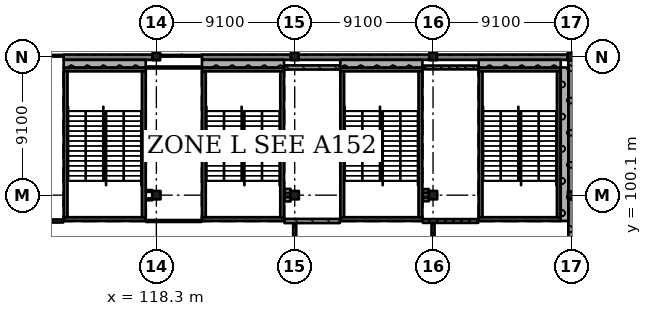
"""IFC4 building model, lengths in metres.
Left out: names, types, materials, properties, quantities, classifications, styles, units other than length and angle.
Written with IfcOpenShell. Run it as: python <this file> out.ifc"""

import sys

from ifc_helpers import new_model, si_unit, direction, frame, frame_2d, origin, origin_2d, place, context, subcontext, project, spatial, rectangle, extrude, element, fill, save


model = new_model("IFC4")
c1 = context("Model", 3, precision=1e-05, world=origin(), true_north=direction((0.0, 1.0)))
c2 = subcontext(c1, "Body", "Model", "MODEL_VIEW")
j1 = project(units=[si_unit("LENGTHUNIT", "METRE"), si_unit("PLANEANGLEUNIT", "RADIAN")], contexts=[c1])
p1 = place(None, origin())
s1 = spatial("IfcSite", under=j1, at=p1, CompositionType="ELEMENT")
p2 = place(p1, origin())
s2 = spatial("IfcBuilding", under=s1, at=p2, CompositionType="ELEMENT")
p3 = place(p2, frame((0.0, 0.0, 15.47)))
s3 = spatial("IfcBuildingStorey", under=s2, at=p3, CompositionType="ELEMENT", Elevation=15.47)
p4 = place(p3, frame((118.3, 100.1, 0.0), z_axis=(0.0, 0.0, 1.0), x_axis=(1.0, 0.0, 0.0)))
e1 = element("IfcColumn", 1, at=p4, inside=s3, PredefinedType="COLUMN", context=c2, shape_type="SweptSolid", body=[
    extrude(rectangle(XDim=0.55, YDim=0.55, at=origin_2d()), origin(), (0.0, 0.0, 1.0), 4.55),
])
p5 = place(p3, frame((118.3, 109.225, 0.0), z_axis=(0.0, 0.0, 1.0), x_axis=(1.0, 0.0, 0.0)))
e2 = element("IfcColumn", 2, at=p5, inside=s3, PredefinedType="COLUMN", context=c2, shape_type="SweptSolid", body=[
    extrude(rectangle(XDim=0.5, YDim=0.5, at=origin_2d()), origin(), (0.0, 0.0, 1.0), 4.55),
])
p6 = place(p3, frame((127.4, 100.1, 0.0), z_axis=(0.0, 0.0, 1.0), x_axis=(1.0, 0.0, 0.0)))
e3 = element("IfcColumn", 3, at=p6, inside=s3, PredefinedType="COLUMN", context=c2, shape_type="SweptSolid", body=[
    extrude(rectangle(XDim=0.55, YDim=0.55, at=origin_2d()), origin(), (0.0, 0.0, 1.0), 4.55),
])
p7 = place(p3, frame((127.4, 109.225, 0.0), z_axis=(0.0, 0.0, 1.0), x_axis=(1.0, 0.0, 0.0)))
e4 = element("IfcColumn", 4, at=p7, inside=s3, PredefinedType="COLUMN", context=c2, shape_type="SweptSolid", body=[
    extrude(rectangle(XDim=0.5, YDim=0.5, at=origin_2d()), origin(), (0.0, 0.0, 1.0), 4.55),
])
p8 = place(p3, frame((136.5, 100.1, 0.0), z_axis=(0.0, 0.0, 1.0), x_axis=(1.0, 0.0, 0.0)))
e5 = element("IfcColumn", 5, at=p8, inside=s3, PredefinedType="COLUMN", context=c2, shape_type="SweptSolid", body=[
    extrude(rectangle(XDim=0.55, YDim=0.55, at=origin_2d()), origin(), (0.0, 0.0, 1.0), 4.55),
])
for number, where, z_axis, x_axis in (
    (6, (136.5, 109.225, 0.0), (0.0, 0.0, 1.0), (1.0, 0.0, 0.0)),
    (7, (145.625, 100.1, 0.0), (0.0, 0.0, 1.0), (1.0, 0.0, 0.0)),
    (8, (145.6, 109.2, 0.0), (0.0, 0.0, 1.0), (1.0, 0.0, 0.0)),
):
    element("IfcColumn", number, at=place(p3, frame(where, z_axis=z_axis, x_axis=x_axis)), inside=s3, PredefinedType="COLUMN", context=c2, shape_type="SweptSolid", body=[
        extrude(rectangle(XDim=0.5, YDim=0.5, at=origin_2d()), origin(), (0.0, 0.0, 1.0), 4.55),
    ])
p9 = place(p3, frame((144.9, 98.525, 0.0), z_axis=(0.0, 0.0, 1.0), x_axis=(-1.0, 0.0, 0.0)))
e9 = element("IfcWall", 9, at=p9, inside=s3, PredefinedType="SHEAR", context=c2, shape_type="SweptSolid", body=[
    extrude(rectangle(XDim=5.4, YDim=0.25, at=frame_2d((2.7, 0.0))), origin(), (0.0, 0.0, 1.0), 4.55),
])
p10 = place(p9, frame((1.5, 0.0, 0.0)))
e10 = element("IfcOpeningElement", 10, at=p10, cuts=e9, PredefinedType="OPENING", context=c2, shape_type="SweptSolid", body=[
    extrude(rectangle(XDim=2.4, YDim=2.1, at=frame_2d((1.2, 1.05))), frame((0.0, 0.135, 0.0), z_axis=(0.0, -1.0, 0.0), x_axis=(1.0, 0.0, 0.0)), (0.0, 0.0, 1.0), 0.27),
])
p11 = place(p3, frame((144.9, 108.375, 0.0), z_axis=(0.0, 0.0, 1.0), x_axis=(-1.0, 0.0, 0.0)))
e11 = element("IfcWall", 11, at=p11, inside=s3, PredefinedType="SHEAR", context=c2, shape_type="SweptSolid", body=[
    extrude(rectangle(XDim=5.4, YDim=0.25, at=frame_2d((2.7, 0.0))), origin(), (0.0, 0.0, 1.0), 4.55),
])
for number, where, z_axis, x_axis in (
    (12, (139.625, 108.25, 0.0), (0.0, 0.0, 1.0), (0.0, -1.0, 0.0)),
    (13, (144.775, 108.25, 0.0), (0.0, 0.0, 1.0), (0.0, -1.0, 0.0)),
):
    element("IfcWall", number, at=place(p3, frame(where, z_axis=z_axis, x_axis=x_axis)), inside=s3, PredefinedType="SHEAR", context=c2, shape_type="SweptSolid", body=[
        extrude(rectangle(XDim=9.6, YDim=0.25, at=frame_2d((4.8, 0.0))), origin(), (0.0, 0.0, 1.0), 4.55),
    ])
p12 = place(p3, frame((135.8, 98.525, 0.0), z_axis=(0.0, 0.0, 1.0), x_axis=(-1.0, 0.0, 0.0)))
e14 = element("IfcWall", 14, at=p12, inside=s3, PredefinedType="SHEAR", context=c2, shape_type="SweptSolid", body=[
    extrude(rectangle(XDim=5.4, YDim=0.25, at=frame_2d((2.7, 0.0))), origin(), (0.0, 0.0, 1.0), 4.55),
])
p13 = place(p12, frame((1.5, 0.0, 0.0)))
e15 = element("IfcOpeningElement", 15, at=p13, cuts=e14, PredefinedType="OPENING", context=c2, shape_type="SweptSolid", body=[
    extrude(rectangle(XDim=2.4, YDim=2.1, at=frame_2d((1.2, 1.05))), frame((0.0, 0.135, 0.0), z_axis=(0.0, -1.0, 0.0), x_axis=(1.0, 0.0, 0.0)), (0.0, 0.0, 1.0), 0.27),
])
p14 = place(p3, frame((135.8, 108.375, 0.0), z_axis=(0.0, 0.0, 1.0), x_axis=(-1.0, 0.0, 0.0)))
e16 = element("IfcWall", 16, at=p14, inside=s3, PredefinedType="SHEAR", context=c2, shape_type="SweptSolid", body=[
    extrude(rectangle(XDim=5.4, YDim=0.25, at=frame_2d((2.7, 0.0))), origin(), (0.0, 0.0, 1.0), 4.55),
])
for number, where, z_axis, x_axis in (
    (17, (130.525, 108.25, 0.0), (0.0, 0.0, 1.0), (0.0, -1.0, 0.0)),
    (18, (135.675, 108.25, 0.0), (0.0, 0.0, 1.0), (0.0, -1.0, 0.0)),
):
    element("IfcWall", number, at=place(p3, frame(where, z_axis=z_axis, x_axis=x_axis)), inside=s3, PredefinedType="SHEAR", context=c2, shape_type="SweptSolid", body=[
        extrude(rectangle(XDim=9.6, YDim=0.25, at=frame_2d((4.8, 0.0))), origin(), (0.0, 0.0, 1.0), 4.55),
    ])
p15 = place(p3, frame((126.7, 98.525, 0.0), z_axis=(0.0, 0.0, 1.0), x_axis=(-1.0, 0.0, 0.0)))
e19 = element("IfcWall", 19, at=p15, inside=s3, PredefinedType="SHEAR", context=c2, shape_type="SweptSolid", body=[
    extrude(rectangle(XDim=5.4, YDim=0.25, at=frame_2d((2.7, 0.0))), origin(), (0.0, 0.0, 1.0), 4.55),
])
p16 = place(p15, frame((1.5, 0.0, 0.0)))
e20 = element("IfcOpeningElement", 20, at=p16, cuts=e19, PredefinedType="OPENING", context=c2, shape_type="SweptSolid", body=[
    extrude(rectangle(XDim=2.4, YDim=2.1, at=frame_2d((1.2, 1.05))), frame((0.0, 0.135, 0.0), z_axis=(0.0, -1.0, 0.0), x_axis=(1.0, 0.0, 0.0)), (0.0, 0.0, 1.0), 0.27),
])
p17 = place(p3, frame((126.7, 108.375, 0.0), z_axis=(0.0, 0.0, 1.0), x_axis=(-1.0, 0.0, 0.0)))
e21 = element("IfcWall", 21, at=p17, inside=s3, PredefinedType="SHEAR", context=c2, shape_type="SweptSolid", body=[
    extrude(rectangle(XDim=5.4, YDim=0.25, at=frame_2d((2.7, 0.0))), origin(), (0.0, 0.0, 1.0), 4.55),
])
for number, where, z_axis, x_axis in (
    (22, (121.425, 108.25, 0.0), (0.0, 0.0, 1.0), (0.0, -1.0, 0.0)),
    (23, (126.575, 108.25, 0.0), (0.0, 0.0, 1.0), (0.0, -1.0, 0.0)),
):
    element("IfcWall", number, at=place(p3, frame(where, z_axis=z_axis, x_axis=x_axis)), inside=s3, PredefinedType="SHEAR", context=c2, shape_type="SweptSolid", body=[
        extrude(rectangle(XDim=9.6, YDim=0.25, at=frame_2d((4.8, 0.0))), origin(), (0.0, 0.0, 1.0), 4.55),
    ])
p18 = place(p3, frame((117.6, 98.525, 0.0), z_axis=(0.0, 0.0, 1.0), x_axis=(-1.0, 0.0, 0.0)))
e24 = element("IfcWall", 24, at=p18, inside=s3, PredefinedType="SHEAR", context=c2, shape_type="SweptSolid", body=[
    extrude(rectangle(XDim=5.4, YDim=0.25, at=frame_2d((2.7, 0.0))), origin(), (0.0, 0.0, 1.0), 4.55),
])
p19 = place(p18, frame((1.5, 0.0, 0.0)))
e25 = element("IfcOpeningElement", 25, at=p19, cuts=e24, PredefinedType="OPENING", context=c2, shape_type="SweptSolid", body=[
    extrude(rectangle(XDim=2.4, YDim=2.1, at=frame_2d((1.2, 1.05))), frame((0.0, 0.135, 0.0), z_axis=(0.0, -1.0, 0.0), x_axis=(1.0, 0.0, 0.0)), (0.0, 0.0, 1.0), 0.27),
])
p20 = place(p3, frame((117.6, 108.375, 0.0), z_axis=(0.0, 0.0, 1.0), x_axis=(-1.0, 0.0, 0.0)))
e26 = element("IfcWall", 26, at=p20, inside=s3, PredefinedType="SHEAR", context=c2, shape_type="SweptSolid", body=[
    extrude(rectangle(XDim=5.4, YDim=0.25, at=frame_2d((2.7, 0.0))), origin(), (0.0, 0.0, 1.0), 4.55),
])
for number, where, z_axis, x_axis in (
    (27, (112.325, 108.25, 0.0), (0.0, 0.0, 1.0), (0.0, -1.0, 0.0)),
    (28, (117.475, 108.25, 0.0), (0.0, 0.0, 1.0), (0.0, -1.0, 0.0)),
):
    element("IfcWall", number, at=place(p3, frame(where, z_axis=z_axis, x_axis=x_axis)), inside=s3, PredefinedType="SHEAR", context=c2, shape_type="SweptSolid", body=[
        extrude(rectangle(XDim=9.6, YDim=0.25, at=frame_2d((4.8, 0.0))), origin(), (0.0, 0.0, 1.0), 4.55),
    ])
p21 = place(p3, frame((145.575, 91.25, 0.0), z_axis=(0.0, 0.0, 1.0), x_axis=(0.0, 1.0, 0.0)))
e29 = element("IfcWall", 29, at=p21, inside=s3, PredefinedType="SOLIDWALL", context=c2, shape_type="SweptSolid", body=[
    extrude(rectangle(XDim=8.6, YDim=0.35, at=frame_2d((4.3, 0.0))), origin(), (0.0, 0.0, 1.0), 3.55),
])
p22 = place(p3, frame((145.575, 100.35, 0.0), z_axis=(0.0, 0.0, 1.0), x_axis=(0.0, 1.0, 0.0)))
e30 = element("IfcWall", 30, at=p22, inside=s3, PredefinedType="SOLIDWALL", context=c2, shape_type="SweptSolid", body=[
    extrude(rectangle(XDim=8.6, YDim=0.35, at=frame_2d((4.3, 0.0))), origin(), (0.0, 0.0, 1.0), 3.55),
])
for number, where, z_axis, x_axis in (
    (31, (145.35, 109.175, 0.0), (0.0, 0.0, 1.0), (-1.0, 0.0, 0.0)),
    (32, (136.25, 109.175, 0.0), (0.0, 0.0, 1.0), (-1.0, 0.0, 0.0)),
):
    element("IfcWall", number, at=place(p3, frame(where, z_axis=z_axis, x_axis=x_axis)), inside=s3, PredefinedType="SOLIDWALL", context=c2, shape_type="SweptSolid", body=[
        extrude(rectangle(XDim=8.6, YDim=0.35, at=frame_2d((4.3, 0.0))), origin(), (0.0, 0.0, 1.0), 3.55),
    ])
p23 = place(p3, frame((127.15, 109.175, 0.0), z_axis=(0.0, 0.0, 1.0), x_axis=(-1.0, 0.0, 0.0)))
e33 = element("IfcWall", 33, at=p23, inside=s3, PredefinedType="SOLIDWALL", context=c2, shape_type="SweptSolid", body=[
    extrude(rectangle(XDim=5.85, YDim=0.35, at=frame_2d((2.925, 0.0))), origin(), (0.0, 0.0, 1.0), 3.55),
])
p24 = place(p3, frame((118.05, 109.175, 0.0), z_axis=(0.0, 0.0, 1.0), x_axis=(-1.0, 0.0, 0.0)))
e34 = element("IfcWall", 34, at=p24, inside=s3, PredefinedType="SOLIDWALL", context=c2, shape_type="SweptSolid", body=[
    extrude(rectangle(XDim=5.85, YDim=0.35, at=frame_2d((2.925, 0.0))), origin(), (0.0, 0.0, 1.0), 3.55),
])
p25 = place(p3, frame((139.5, 108.75, 0.0), z_axis=(0.0, 0.0, 1.0), x_axis=(1.0, 0.0, 0.0)))
e35 = element("IfcWall", 35, at=p25, inside=s3, PredefinedType="SOLIDWALL", context=c2, shape_type="SweptSolid", body=[
    extrude(rectangle(XDim=5.4, YDim=0.5, at=frame_2d((2.7, 0.0))), origin(), (0.0, 0.0, 1.0), 4.3),
])
p26 = place(p3, frame((145.15, 98.4, 0.0), z_axis=(0.0, 0.0, 1.0), x_axis=(0.0, 1.0, 0.0)))
e36 = element("IfcWall", 36, at=p26, inside=s3, PredefinedType="SOLIDWALL", context=c2, shape_type="SweptSolid", body=[
    extrude(rectangle(XDim=10.1, YDim=0.5, at=frame_2d((5.05, 0.0))), origin(), (0.0, 0.0, 1.0), 4.55),
])
p27 = place(p3, frame((130.4, 108.75, 0.0), z_axis=(0.0, 0.0, 1.0), x_axis=(1.0, 0.0, 0.0)))
e37 = element("IfcWall", 37, at=p27, inside=s3, PredefinedType="SOLIDWALL", context=c2, shape_type="SweptSolid", body=[
    extrude(rectangle(XDim=5.4, YDim=0.5, at=frame_2d((2.7, 0.0))), origin(), (0.0, 0.0, 1.0), 4.3),
])
p28 = place(p3, frame((121.3, 108.75, 0.0), z_axis=(0.0, 0.0, 1.0), x_axis=(1.0, 0.0, 0.0)))
e38 = element("IfcWall", 38, at=p28, inside=s3, PredefinedType="SOLIDWALL", context=c2, shape_type="SweptSolid", body=[
    extrude(rectangle(XDim=5.4, YDim=0.5, at=frame_2d((2.7, 0.0))), origin(), (0.0, 0.0, 1.0), 4.3),
])
p29 = place(p3, frame((112.2, 108.75, 0.0), z_axis=(0.0, 0.0, 1.0), x_axis=(1.0, 0.0, 0.0)))
e39 = element("IfcWall", 39, at=p29, inside=s3, PredefinedType="SOLIDWALL", context=c2, shape_type="SweptSolid", body=[
    extrude(rectangle(XDim=5.4, YDim=0.5, at=frame_2d((2.7, 0.0))), origin(), (0.0, 0.0, 1.0), 4.3),
])
p30 = place(p3, frame((109.425, 98.4, 0.0), z_axis=(0.0, 0.0, 1.0), x_axis=(1.0, 0.0, 0.0)))
e40 = element("IfcWall", 40, at=p30, inside=s3, PredefinedType="PARTITIONING", context=c2, shape_type="SweptSolid", body=[
    extrude(rectangle(XDim=2.745, YDim=0.2, at=frame_2d((1.373, 0.0))), origin(), (0.0, 0.0, 1.0), 4.3),
])
p31 = place(p30, frame((0.45, 0.0, 0.0)))
e41 = element("IfcOpeningElement", 41, at=p31, cuts=e40, PredefinedType="OPENING", context=c2, shape_type="SweptSolid", body=[
    extrude(rectangle(XDim=1.8, YDim=2.4, at=frame_2d((0.9, 1.2))), frame((0.0, 0.11, 0.0), z_axis=(0.0, -1.0, 0.0), x_axis=(1.0, 0.0, 0.0)), (0.0, 0.0, 1.0), 0.22),
])
p32 = place(p3, frame((117.63, 98.4, 0.0), z_axis=(0.0, 0.0, 1.0), x_axis=(1.0, 0.0, 0.0)))
e42 = element("IfcWall", 42, at=p32, inside=s3, PredefinedType="PARTITIONING", context=c2, shape_type="SweptSolid", body=[
    extrude(rectangle(XDim=3.64, YDim=0.125, at=frame_2d((1.82, 0.0))), origin(), (0.0, 0.0, 1.0), 4.3),
])
p33 = place(p32, frame((1.35, 0.0, 0.0)))
e43 = element("IfcOpeningElement", 43, at=p33, cuts=e42, PredefinedType="OPENING", context=c2, shape_type="SweptSolid", body=[
    extrude(rectangle(XDim=0.9, YDim=2.1, at=frame_2d((0.45, 1.05))), frame((0.0, 0.073, 0.0), z_axis=(0.0, -1.0, 0.0), x_axis=(1.0, 0.0, 0.0)), (0.0, 0.0, 1.0), 0.145),
])
p34 = place(p3, frame((117.63, 99.825, 0.0), z_axis=(0.0, 0.0, 1.0), x_axis=(1.0, 0.0, 0.0)))
e44 = element("IfcWall", 44, at=p34, inside=s3, PredefinedType="PARTITIONING", context=c2, shape_type="SweptSolid", body=[
    extrude(rectangle(XDim=0.395, YDim=0.125, at=frame_2d((0.198, 0.0))), origin(), (0.0, 0.0, 1.0), 4.3),
])
p35 = place(p3, frame((117.63, 108.5, 0.0), z_axis=(0.0, 0.0, 1.0), x_axis=(1.0, 0.0, 0.0)))
e45 = element("IfcWall", 45, at=p35, inside=s3, PredefinedType="PARTITIONING", context=c2, shape_type="SweptSolid", body=[
    extrude(rectangle(XDim=3.64, YDim=0.125, at=frame_2d((1.82, 0.0))), origin(), (0.0, 0.0, 1.0), 4.3),
])
p36 = place(p3, frame((118.025, 100.375, 0.0), z_axis=(0.0, 0.0, 1.0), x_axis=(-1.0, 0.0, 0.0)))
e46 = element("IfcWall", 46, at=p36, inside=s3, PredefinedType="PARTITIONING", context=c2, shape_type="SweptSolid", body=[
    extrude(rectangle(XDim=0.395, YDim=0.125, at=frame_2d((0.198, 0.0))), origin(), (0.0, 0.0, 1.0), 4.3),
])
p37 = place(p3, frame((126.73, 98.4, 0.0), z_axis=(0.0, 0.0, 1.0), x_axis=(1.0, 0.0, 0.0)))
e47 = element("IfcWall", 47, at=p37, inside=s3, PredefinedType="SOLIDWALL", context=c2, shape_type="SweptSolid", body=[
    extrude(rectangle(XDim=3.64, YDim=0.275, at=frame_2d((1.82, 0.0))), origin(), (0.0, 0.0, 1.0), 4.3),
])
p38 = place(p37, frame((1.52, 0.0, 0.0)))
e48 = element("IfcOpeningElement", 48, at=p38, cuts=e47, PredefinedType="OPENING", context=c2, shape_type="SweptSolid", body=[
    extrude(rectangle(XDim=1.2, YDim=2.4, at=frame_2d((0.6, 1.2))), frame((0.0, 0.147, 0.0), z_axis=(0.0, -1.0, 0.0), x_axis=(1.0, 0.0, 0.0)), (0.0, 0.0, 1.0), 0.295),
])
p39 = place(p3, frame((126.73, 99.825, 0.0), z_axis=(0.0, 0.0, 1.0), x_axis=(1.0, 0.0, 0.0)))
e49 = element("IfcWall", 49, at=p39, inside=s3, PredefinedType="SOLIDWALL", context=c2, shape_type="SweptSolid", body=[
    extrude(rectangle(XDim=0.395, YDim=0.275, at=frame_2d((0.198, 0.0))), origin(), (0.0, 0.0, 1.0), 4.3),
])
p40 = place(p3, frame((126.73, 108.5, 0.0), z_axis=(0.0, 0.0, 1.0), x_axis=(1.0, 0.0, 0.0)))
e50 = element("IfcWall", 50, at=p40, inside=s3, PredefinedType="SOLIDWALL", context=c2, shape_type="SweptSolid", body=[
    extrude(rectangle(XDim=3.64, YDim=0.275, at=frame_2d((1.82, 0.0))), origin(), (0.0, 0.0, 1.0), 4.3),
])
p41 = place(p3, frame((127.125, 100.375, 0.0), z_axis=(0.0, 0.0, 1.0), x_axis=(-1.0, 0.0, 0.0)))
e51 = element("IfcWall", 51, at=p41, inside=s3, PredefinedType="SOLIDWALL", context=c2, shape_type="SweptSolid", body=[
    extrude(rectangle(XDim=0.395, YDim=0.275, at=frame_2d((0.198, 0.0))), origin(), (0.0, 0.0, 1.0), 4.3),
])
p42 = place(p3, frame((127.4, 91.35, 0.0), z_axis=(0.0, 0.0, 1.0), x_axis=(0.0, 1.0, 0.0)))
e52 = element("IfcWall", 52, at=p42, inside=s3, PredefinedType="PARTITIONING", context=c2, shape_type="SweptSolid", body=[
    extrude(rectangle(XDim=6.912, YDim=0.2, at=frame_2d((3.456, 0.0))), origin(), (0.0, 0.0, 1.0), 3.55),
])
p43 = place(p42, frame((0.85, 0.0, 0.0)))
e53 = element("IfcOpeningElement", 53, at=p43, cuts=e52, PredefinedType="OPENING", context=c2, shape_type="SweptSolid", body=[
    extrude(rectangle(XDim=1.8, YDim=2.4, at=frame_2d((0.9, 1.2))), frame((0.0, 0.11, 0.0), z_axis=(0.0, -1.0, 0.0), x_axis=(1.0, 0.0, 0.0)), (0.0, 0.0, 1.0), 0.22),
])
p44 = place(p42, frame((4.25, 0.0, 0.0)))
e54 = element("IfcOpeningElement", 54, at=p44, cuts=e52, PredefinedType="OPENING", context=c2, shape_type="SweptSolid", body=[
    extrude(rectangle(XDim=1.8, YDim=2.4, at=frame_2d((0.9, 1.2))), frame((0.0, 0.11, 0.0), z_axis=(0.0, -1.0, 0.0), x_axis=(1.0, 0.0, 0.0)), (0.0, 0.0, 1.0), 0.22),
])
p45 = place(p3, frame((135.83, 98.4, 0.0), z_axis=(0.0, 0.0, 1.0), x_axis=(1.0, 0.0, 0.0)))
e55 = element("IfcWall", 55, at=p45, inside=s3, PredefinedType="SOLIDWALL", context=c2, shape_type="SweptSolid", body=[
    extrude(rectangle(XDim=3.64, YDim=0.25, at=frame_2d((1.82, 0.0))), origin(), (0.0, 0.0, 1.0), 4.3),
])
p46 = place(p45, frame((1.62, 0.0, 0.0)))
e56 = element("IfcOpeningElement", 56, at=p46, cuts=e55, PredefinedType="OPENING", context=c2, shape_type="SweptSolid", body=[
    extrude(rectangle(XDim=1.0, YDim=2.1, at=frame_2d((0.5, 1.05))), frame((0.0, 0.135, 0.0), z_axis=(0.0, -1.0, 0.0), x_axis=(1.0, 0.0, 0.0)), (0.0, 0.0, 1.0), 0.27),
])
p47 = place(p3, frame((135.83, 99.825, 0.0), z_axis=(0.0, 0.0, 1.0), x_axis=(1.0, 0.0, 0.0)))
e57 = element("IfcWall", 57, at=p47, inside=s3, PredefinedType="SOLIDWALL", context=c2, shape_type="SweptSolid", body=[
    extrude(rectangle(XDim=0.395, YDim=0.25, at=frame_2d((0.198, 0.0))), origin(), (0.0, 0.0, 1.0), 4.3),
])
p48 = place(p3, frame((135.83, 108.5, 0.0), z_axis=(0.0, 0.0, 1.0), x_axis=(1.0, 0.0, 0.0)))
e58 = element("IfcWall", 58, at=p48, inside=s3, PredefinedType="SOLIDWALL", context=c2, shape_type="SweptSolid", body=[
    extrude(rectangle(XDim=3.64, YDim=0.25, at=frame_2d((1.82, 0.0))), origin(), (0.0, 0.0, 1.0), 4.3),
])
p49 = place(p3, frame((136.225, 100.375, 0.0), z_axis=(0.0, 0.0, 1.0), x_axis=(-1.0, 0.0, 0.0)))
e59 = element("IfcWall", 59, at=p49, inside=s3, PredefinedType="SOLIDWALL", context=c2, shape_type="SweptSolid", body=[
    extrude(rectangle(XDim=0.395, YDim=0.25, at=frame_2d((0.198, 0.0))), origin(), (0.0, 0.0, 1.0), 4.3),
])
p50 = place(p3, frame((136.5, 91.325, 0.0), z_axis=(0.0, 0.0, 1.0), x_axis=(0.0, 1.0, 0.0)))
e60 = element("IfcWall", 60, at=p50, inside=s3, PredefinedType="PARTITIONING", context=c2, shape_type="SweptSolid", body=[
    extrude(rectangle(XDim=6.95, YDim=0.2, at=frame_2d((3.475, 0.0))), origin(), (0.0, 0.0, 1.0), 3.55),
])
p51 = place(p50, frame((0.85, 0.0, 0.0)))
e61 = element("IfcOpeningElement", 61, at=p51, cuts=e60, PredefinedType="OPENING", context=c2, shape_type="SweptSolid", body=[
    extrude(rectangle(XDim=1.8, YDim=2.4, at=frame_2d((0.9, 1.2))), frame((0.0, 0.11, 0.0), z_axis=(0.0, -1.0, 0.0), x_axis=(1.0, 0.0, 0.0)), (0.0, 0.0, 1.0), 0.22),
])
p52 = place(p50, frame((4.35, 0.0, 0.0)))
e62 = element("IfcOpeningElement", 62, at=p52, cuts=e60, PredefinedType="OPENING", context=c2, shape_type="SweptSolid", body=[
    extrude(rectangle(XDim=1.8, YDim=2.4, at=frame_2d((0.9, 1.2))), frame((0.0, 0.11, 0.0), z_axis=(0.0, -1.0, 0.0), x_axis=(1.0, 0.0, 0.0)), (0.0, 0.0, 1.0), 0.22),
])
p53 = place(p46, origin())
e63 = element("IfcDoor", 63, at=p53, inside=s3, OperationType="SINGLE_SWING_RIGHT", PredefinedType="DOOR", context=c2, shape_type="SweptSolid", body=[
    extrude(rectangle(XDim=1.0, YDim=2.1, at=frame_2d((0.5, 1.05))), frame((0.0, 0.025, 0.0), z_axis=(0.0, -1.0, 0.0), x_axis=(1.0, 0.0, 0.0)), (0.0, 0.0, 1.0), 0.05),
])
fill(e56, e63)
p54 = place(p38, origin())
e64 = element("IfcDoor", 64, at=p54, inside=s3, OperationType="SINGLE_SWING_RIGHT", PredefinedType="DOOR", context=c2, shape_type="SweptSolid", body=[
    extrude(rectangle(XDim=1.2, YDim=2.4, at=frame_2d((0.6, 1.2))), frame((0.0, 0.025, 0.0), z_axis=(0.0, -1.0, 0.0), x_axis=(1.0, 0.0, 0.0)), (0.0, 0.0, 1.0), 0.05),
])
fill(e48, e64)
p55 = place(p33, origin())
e65 = element("IfcDoor", 65, at=p55, inside=s3, OperationType="SINGLE_SWING_RIGHT", PredefinedType="DOOR", context=c2, shape_type="SweptSolid", body=[
    extrude(rectangle(XDim=0.9, YDim=2.1, at=frame_2d((0.45, 1.05))), frame((0.0, 0.025, 0.0), z_axis=(0.0, -1.0, 0.0), x_axis=(1.0, 0.0, 0.0)), (0.0, 0.0, 1.0), 0.05),
])
fill(e43, e65)
p56 = place(p52, origin())
e66 = element("IfcDoor", 66, at=p56, inside=s3, OperationType="DOUBLE_DOOR_SINGLE_SWING", PredefinedType="DOOR", context=c2, shape_type="SweptSolid", body=[
    extrude(rectangle(XDim=1.8, YDim=2.4, at=frame_2d((0.9, 1.2))), frame((0.0, 0.025, 0.0), z_axis=(0.0, -1.0, 0.0), x_axis=(1.0, 0.0, 0.0)), (0.0, 0.0, 1.0), 0.05),
])
fill(e62, e66)
p57 = place(p44, origin())
e67 = element("IfcDoor", 67, at=p57, inside=s3, OperationType="DOUBLE_DOOR_SINGLE_SWING", PredefinedType="DOOR", context=c2, shape_type="SweptSolid", body=[
    extrude(rectangle(XDim=1.8, YDim=2.4, at=frame_2d((0.9, 1.2))), frame((0.0, 0.025, 0.0), z_axis=(0.0, -1.0, 0.0), x_axis=(1.0, 0.0, 0.0)), (0.0, 0.0, 1.0), 0.05),
])
fill(e54, e67)
p58 = place(p31, origin())
e68 = element("IfcDoor", 68, at=p58, inside=s3, OperationType="DOUBLE_DOOR_SINGLE_SWING", PredefinedType="DOOR", context=c2, shape_type="SweptSolid", body=[
    extrude(rectangle(XDim=1.8, YDim=2.4, at=frame_2d((0.9, 1.2))), frame((0.0, 0.025, 0.0), z_axis=(0.0, -1.0, 0.0), x_axis=(1.0, 0.0, 0.0)), (0.0, 0.0, 1.0), 0.05),
])
fill(e41, e68)
p59 = place(p10, origin())
e69 = element("IfcDoor", 69, at=p59, inside=s3, OperationType="DOUBLE_DOOR_SINGLE_SWING", PredefinedType="DOOR", context=c2, shape_type="SweptSolid", body=[
    extrude(rectangle(XDim=2.4, YDim=2.1, at=frame_2d((1.2, 1.05))), frame((0.0, 0.025, 0.0), z_axis=(0.0, -1.0, 0.0), x_axis=(1.0, 0.0, 0.0)), (0.0, 0.0, 1.0), 0.05),
])
fill(e10, e69)
p60 = place(p13, origin())
e70 = element("IfcDoor", 70, at=p60, inside=s3, OperationType="DOUBLE_DOOR_SINGLE_SWING", PredefinedType="DOOR", context=c2, shape_type="SweptSolid", body=[
    extrude(rectangle(XDim=2.4, YDim=2.1, at=frame_2d((1.2, 1.05))), frame((0.0, 0.025, 0.0), z_axis=(0.0, -1.0, 0.0), x_axis=(1.0, 0.0, 0.0)), (0.0, 0.0, 1.0), 0.05),
])
fill(e15, e70)
p61 = place(p16, origin())
e71 = element("IfcDoor", 71, at=p61, inside=s3, OperationType="DOUBLE_DOOR_SINGLE_SWING", PredefinedType="DOOR", context=c2, shape_type="SweptSolid", body=[
    extrude(rectangle(XDim=2.4, YDim=2.1, at=frame_2d((1.2, 1.05))), frame((0.0, 0.025, 0.0), z_axis=(0.0, -1.0, 0.0), x_axis=(1.0, 0.0, 0.0)), (0.0, 0.0, 1.0), 0.05),
])
fill(e20, e71)
p62 = place(p19, origin())
e72 = element("IfcDoor", 72, at=p62, inside=s3, OperationType="DOUBLE_DOOR_SINGLE_SWING", PredefinedType="DOOR", context=c2, shape_type="SweptSolid", body=[
    extrude(rectangle(XDim=2.4, YDim=2.1, at=frame_2d((1.2, 1.05))), frame((0.0, 0.025, 0.0), z_axis=(0.0, -1.0, 0.0), x_axis=(1.0, 0.0, 0.0)), (0.0, 0.0, 1.0), 0.05),
])
fill(e25, e72)
save(model, sys.argv[1])
